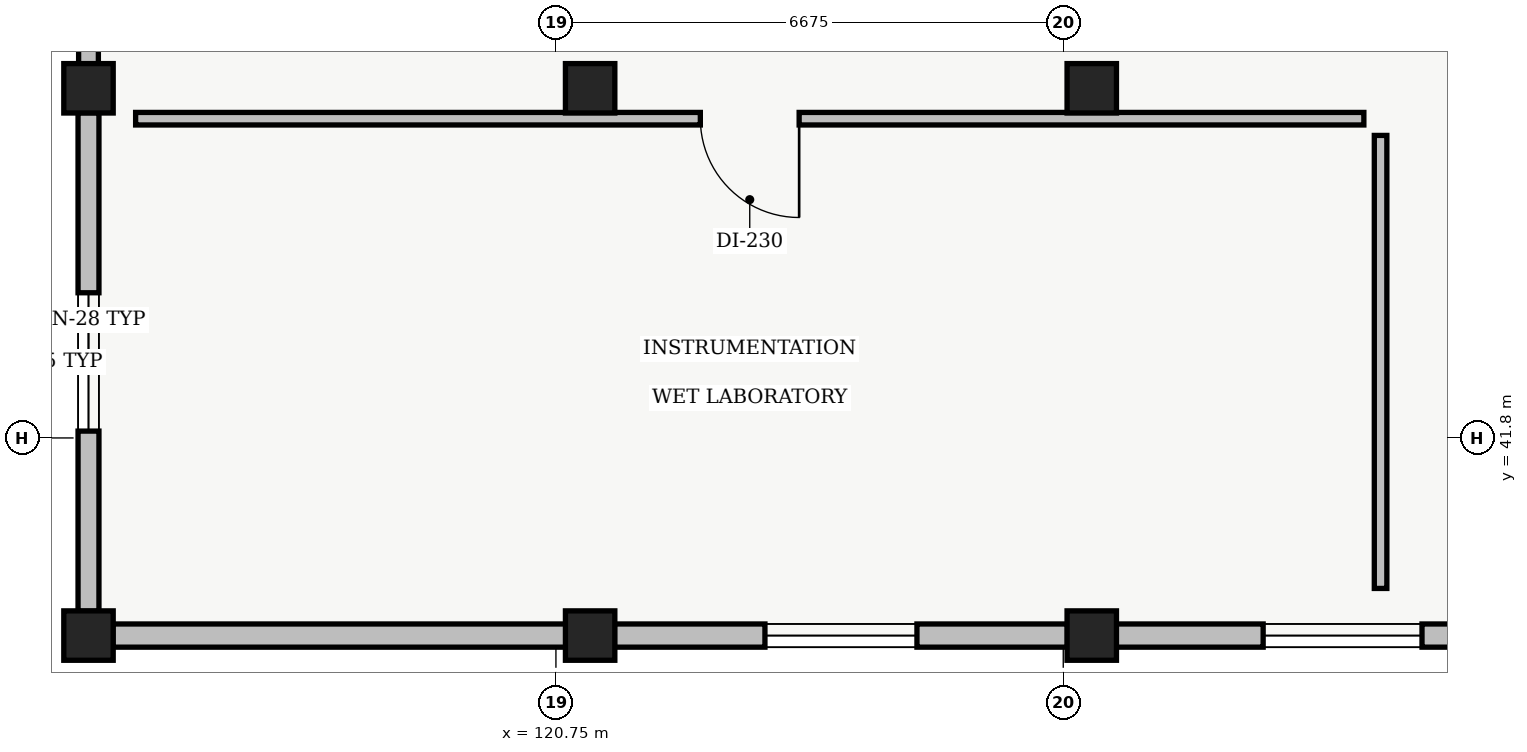
"""IFC4 building model, lengths in metres.
Left out: names, types, materials, properties, quantities, classifications, styles, units other than length and angle.
Written with IfcOpenShell. Run it as: python <this file> out.ifc"""

import sys

from ifc_helpers import new_model, si_unit, direction, frame, frame_2d, origin, origin_2d, place, context, subcontext, project, spatial, rectangle, extrude, element, fill, save


model = new_model("IFC4")
c1 = context("Model", 3, precision=1e-05, world=origin(), true_north=direction((0.0, 1.0)))
c2 = subcontext(c1, "Body", "Model", "MODEL_VIEW")
j1 = project(units=[si_unit("LENGTHUNIT", "METRE"), si_unit("PLANEANGLEUNIT", "RADIAN")], contexts=[c1])
p1 = place(None, origin())
s1 = spatial("IfcSite", under=j1, at=p1, CompositionType="ELEMENT")
p2 = place(p1, origin())
s2 = spatial("IfcBuilding", under=s1, at=p2, CompositionType="ELEMENT")
p3 = place(p2, frame((0.0, 0.0, 18.6)))
s3 = spatial("IfcBuildingStorey", under=s2, at=p3, CompositionType="ELEMENT", Elevation=18.6)
for number, where, z_axis, x_axis in (
    (1, (114.6, 39.2, 0.0), (0.0, 0.0, 1.0), (1.0, 0.0, 0.0)),
    (2, (114.6, 46.4, 0.0), (0.0, 0.0, 1.0), (1.0, 0.0, 0.0)),
    (3, (121.2, 39.2, 0.0), (0.0, 0.0, 1.0), (1.0, 0.0, 0.0)),
    (4, (121.2, 46.4, 0.0), (0.0, 0.0, 1.0), (1.0, 0.0, 0.0)),
    (5, (127.8, 39.2, 0.0), (0.0, 0.0, 1.0), (1.0, 0.0, 0.0)),
    (6, (127.8, 46.4, 0.0), (0.0, 0.0, 1.0), (1.0, 0.0, 0.0)),
):
    element("IfcColumn", number, at=place(p3, frame(where, z_axis=z_axis, x_axis=x_axis)), inside=s3, PredefinedType="COLUMN", context=c2, shape_type="SweptSolid", body=[
        extrude(rectangle(XDim=0.65, YDim=0.65, at=origin_2d()), origin(), (0.0, 0.0, 1.0), 4.3),
    ])
p4 = place(p3, frame((114.6, 39.52, 0.0), z_axis=(0.0, 0.0, 1.0), x_axis=(0.0, 1.0, 0.0)))
e7 = element("IfcWall", 7, at=p4, inside=s3, PredefinedType="STANDARD", context=c2, shape_type="SweptSolid", body=[
    extrude(rectangle(XDim=6.56, YDim=0.275, at=frame_2d((3.28, 0.0))), origin(), (0.0, 0.0, 1.0), 3.835),
])
p5 = place(p4, frame((2.37, 0.0, 0.95)))
e8 = element("IfcOpeningElement", 8, at=p5, cuts=e7, PredefinedType="OPENING", context=c2, shape_type="SweptSolid", body=[
    extrude(rectangle(XDim=1.82, YDim=1.38, at=frame_2d((0.91, 0.69))), frame((0.0, 0.137, 0.0), z_axis=(0.0, -1.0, 0.0), x_axis=(1.0, 0.0, 0.0)), (0.0, 0.0, 1.0), 0.275),
])
p6 = place(p3, frame((114.6, 46.72, 0.0), z_axis=(0.0, 0.0, 1.0), x_axis=(0.0, 1.0, 0.0)))
e9 = element("IfcWall", 9, at=p6, inside=s3, PredefinedType="STANDARD", context=c2, shape_type="SweptSolid", body=[
    extrude(rectangle(XDim=6.56, YDim=0.26, at=frame_2d((3.28, 0.0))), origin(), (0.0, 0.0, 1.0), 3.835),
])
p7 = place(p6, frame((2.325, 0.0, 0.95)))
e10 = element("IfcOpeningElement", 10, at=p7, cuts=e9, PredefinedType="OPENING", context=c2, shape_type="SweptSolid", body=[
    extrude(rectangle(XDim=1.91, YDim=1.4, at=frame_2d((0.955, 0.7))), frame((0.0, 0.13, 0.0), z_axis=(0.0, -1.0, 0.0), x_axis=(1.0, 0.0, 0.0)), (0.0, 0.0, 1.0), 0.26),
])
p8 = place(p3, frame((134.08, 39.2, 0.0), z_axis=(0.0, 0.0, 1.0), x_axis=(-1.0, 0.0, 0.0)))
e11 = element("IfcWall", 11, at=p8, inside=s3, PredefinedType="STANDARD", context=c2, shape_type="SweptSolid", body=[
    extrude(rectangle(XDim=5.96, YDim=0.305, at=frame_2d((2.98, 0.0))), origin(), (0.0, 0.0, 1.0), 3.835),
])
p9 = place(p8, frame((1.935, 0.0, 0.95)))
e12 = element("IfcOpeningElement", 12, at=p9, cuts=e11, PredefinedType="OPENING", context=c2, shape_type="SweptSolid", body=[
    extrude(rectangle(XDim=2.09, YDim=1.44, at=frame_2d((1.045, 0.72))), frame((0.0, 0.152, 0.0), z_axis=(0.0, -1.0, 0.0), x_axis=(1.0, 0.0, 0.0)), (0.0, 0.0, 1.0), 0.305),
])
p10 = place(p3, frame((127.48, 39.2, 0.0), z_axis=(0.0, 0.0, 1.0), x_axis=(-1.0, 0.0, 0.0)))
e13 = element("IfcWall", 13, at=p10, inside=s3, PredefinedType="STANDARD", context=c2, shape_type="SweptSolid", body=[
    extrude(rectangle(XDim=5.96, YDim=0.305, at=frame_2d((2.98, 0.0))), origin(), (0.0, 0.0, 1.0), 3.835),
])
p11 = place(p10, frame((1.98, 0.0, 0.95)))
e14 = element("IfcOpeningElement", 14, at=p11, cuts=e13, PredefinedType="OPENING", context=c2, shape_type="SweptSolid", body=[
    extrude(rectangle(XDim=2.0, YDim=1.42, at=frame_2d((1.0, 0.71))), frame((0.0, 0.152, 0.0), z_axis=(0.0, -1.0, 0.0), x_axis=(1.0, 0.0, 0.0)), (0.0, 0.0, 1.0), 0.305),
])
p12 = place(p3, frame((120.88, 39.2, 0.0), z_axis=(0.0, 0.0, 1.0), x_axis=(-1.0, 0.0, 0.0)))
e15 = element("IfcWall", 15, at=p12, inside=s3, PredefinedType="STANDARD", context=c2, shape_type="SweptSolid", body=[
    extrude(rectangle(XDim=5.96, YDim=0.305, at=frame_2d((2.98, 0.0))), origin(), (0.0, 0.0, 1.0), 3.835),
])
p13 = place(p3, frame((131.6, 39.82, 0.0), z_axis=(0.0, 0.0, 1.0), x_axis=(0.0, 1.0, 0.0)))
e16 = element("IfcWall", 16, at=p13, inside=s3, PredefinedType="PARTITIONING", context=c2, shape_type="SweptSolid", body=[
    extrude(rectangle(XDim=5.96, YDim=0.165, at=frame_2d((2.98, 0.0))), origin(), (0.0, 0.0, 1.0), 3.95),
])
p14 = place(p3, frame((131.38, 46.0, 0.0), z_axis=(0.0, 0.0, 1.0), x_axis=(-1.0, 0.0, 0.0)))
e17 = element("IfcWall", 17, at=p14, inside=s3, PredefinedType="PARTITIONING", context=c2, shape_type="SweptSolid", body=[
    extrude(rectangle(XDim=16.16, YDim=0.165, at=frame_2d((8.08, 0.0))), origin(), (0.0, 0.0, 1.0), 3.95),
])
p15 = place(p14, frame((7.43, 0.0, 0.0)))
e18 = element("IfcOpeningElement", 18, at=p15, cuts=e17, PredefinedType="OPENING", context=c2, shape_type="SweptSolid", body=[
    extrude(rectangle(XDim=1.3, YDim=2.1, at=frame_2d((0.65, 1.05))), frame((0.0, 0.083, 0.0), z_axis=(0.0, -1.0, 0.0), x_axis=(1.0, 0.0, 0.0)), (0.0, 0.0, 1.0), 0.165),
])
p16 = place(p5, origin())
e19 = element("IfcWindow", 19, at=p16, inside=s3, PartitioningType="SINGLE_PANEL", PredefinedType="WINDOW", context=c2, shape_type="SweptSolid", body=[
    extrude(rectangle(XDim=1.82, YDim=1.38, at=frame_2d((0.91, 0.69))), frame((0.0, 0.03, 0.0), z_axis=(0.0, -1.0, 0.0), x_axis=(1.0, 0.0, 0.0)), (0.0, 0.0, 1.0), 0.06),
])
fill(e8, e19)
p17 = place(p9, origin())
e20 = element("IfcWindow", 20, at=p17, inside=s3, PartitioningType="SINGLE_PANEL", PredefinedType="WINDOW", context=c2, shape_type="SweptSolid", body=[
    extrude(rectangle(XDim=2.09, YDim=1.44, at=frame_2d((1.045, 0.72))), frame((0.0, 0.03, 0.0), z_axis=(0.0, -1.0, 0.0), x_axis=(1.0, 0.0, 0.0)), (0.0, 0.0, 1.0), 0.06),
])
fill(e12, e20)
p18 = place(p11, origin())
e21 = element("IfcWindow", 21, at=p18, inside=s3, PartitioningType="SINGLE_PANEL", PredefinedType="WINDOW", context=c2, shape_type="SweptSolid", body=[
    extrude(rectangle(XDim=2.0, YDim=1.42, at=frame_2d((1.0, 0.71))), frame((0.0, 0.03, 0.0), z_axis=(0.0, -1.0, 0.0), x_axis=(1.0, 0.0, 0.0)), (0.0, 0.0, 1.0), 0.06),
])
fill(e14, e21)
p19 = place(p15, origin())
e22 = element("IfcDoor", 22, at=p19, inside=s3, OperationType="SINGLE_SWING_LEFT", PredefinedType="DOOR", context=c2, shape_type="SweptSolid", body=[
    extrude(rectangle(XDim=1.3, YDim=2.1, at=frame_2d((0.65, 1.05))), frame((0.0, 0.025, 0.0), z_axis=(0.0, -1.0, 0.0), x_axis=(1.0, 0.0, 0.0)), (0.0, 0.0, 1.0), 0.05),
])
fill(e18, e22)
save(model, sys.argv[1])
